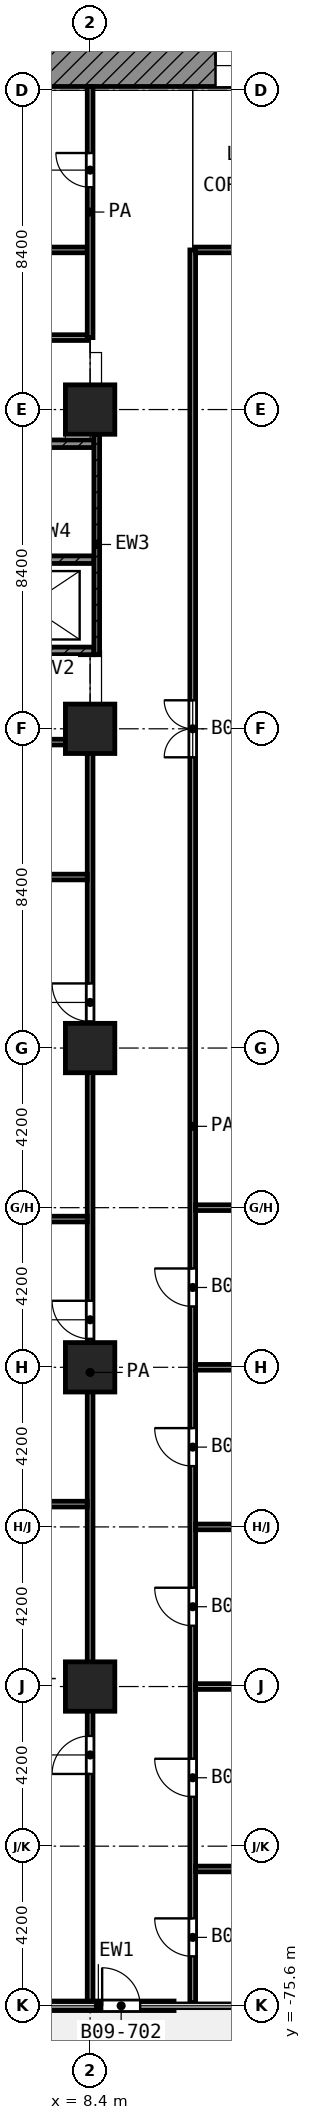
"""IFC4 building model, lengths in metres.
Left out: names, types, materials, properties, quantities, classifications, styles, units other than length and angle.
Written with IfcOpenShell. Run it as: python <this file> out.ifc"""

import sys

from ifc_helpers import new_model, si_unit, direction, frame, frame_2d, origin, origin_2d, place, context, subcontext, project, spatial, rectangle, extrude, element, fill, save


model = new_model("IFC4")
c1 = context("Model", 3, precision=1e-05, world=origin(), true_north=direction((0.0, 1.0)))
c2 = subcontext(c1, "Body", "Model", "MODEL_VIEW")
j1 = project(units=[si_unit("LENGTHUNIT", "METRE"), si_unit("PLANEANGLEUNIT", "RADIAN")], contexts=[c1])
p1 = place(None, origin())
s1 = spatial("IfcSite", under=j1, at=p1, CompositionType="ELEMENT")
p2 = place(p1, origin())
s2 = spatial("IfcBuilding", under=s1, at=p2, CompositionType="ELEMENT")
p3 = place(p2, frame((0.0, 0.0, 43.4)))
s3 = spatial("IfcBuildingStorey", under=s2, at=p3, CompositionType="ELEMENT", Elevation=43.4)
for number, where, z_axis, x_axis in (
    (1, (8.4, -33.6, 0.0), (0.0, 0.0, 1.0), (1.0, 0.0, 0.0)),
    (2, (8.4, -42.0, 0.0), (0.0, 0.0, 1.0), (1.0, 0.0, 0.0)),
    (3, (8.4, -50.4, 0.0), (0.0, 0.0, 1.0), (1.0, 0.0, 0.0)),
    (4, (8.4, -58.8, 0.0), (0.0, 0.0, 1.0), (1.0, 0.0, 0.0)),
    (5, (8.4, -67.2, 0.0), (0.0, 0.0, 1.0), (1.0, 0.0, 0.0)),
):
    element("IfcColumn", number, at=place(p3, frame(where, z_axis=z_axis, x_axis=x_axis)), inside=s3, PredefinedType="COLUMN", context=c2, shape_type="SweptSolid", body=[
        extrude(rectangle(XDim=1.3, YDim=1.3, at=origin_2d()), origin(), (0.0, 0.0, 1.0), 4.2),
    ])
p4 = place(p3, frame((6.625, -75.6, 0.0), z_axis=(0.0, 0.0, 1.0), x_axis=(1.0, 0.0, 0.0)))
e6 = element("IfcWall", 6, at=p4, inside=s3, PredefinedType="SOLIDWALL", context=c2, shape_type="SweptSolid", body=[
    extrude(rectangle(XDim=3.983, YDim=0.25, at=frame_2d((1.992, 0.0))), origin(), (0.0, 0.0, 1.0), 3.78),
])
p5 = place(p4, frame((2.092, 0.0, 0.0)))
e7 = element("IfcOpeningElement", 7, at=p5, cuts=e6, PredefinedType="OPENING", context=c2, shape_type="SweptSolid", body=[
    extrude(rectangle(XDim=1.0, YDim=2.1, at=frame_2d((0.5, 1.05))), frame((0.0, 0.135, 0.0), z_axis=(0.0, -1.0, 0.0), x_axis=(1.0, 0.0, 0.0)), (0.0, 0.0, 1.0), 0.27),
])
p6 = place(p3, frame((5.4, -24.55, 0.0), z_axis=(0.0, 0.0, 1.0), x_axis=(1.0, 0.0, 0.0)))
e8 = element("IfcWall", 8, at=p6, inside=s3, PredefinedType="SHEAR", context=c2, shape_type="SweptSolid", body=[
    extrude(rectangle(XDim=18.6, YDim=1.1, at=frame_2d((9.3, 0.0))), origin(), (0.0, 0.0, 1.0), 3.9),
])
p7 = place(p6, frame((6.3, 0.0, 0.0)))
e9 = element("IfcOpeningElement", 9, at=p7, cuts=e8, PredefinedType="OPENING", context=c2, shape_type="SweptSolid", body=[
    extrude(rectangle(XDim=1.8, YDim=2.1, at=frame_2d((0.9, 1.05))), frame((0.0, 0.56, 0.0), z_axis=(0.0, -1.0, 0.0), x_axis=(1.0, 0.0, 0.0)), (0.0, 0.0, 1.0), 1.12),
])
p8 = place(p3, frame((8.575, -40.05, 0.0), z_axis=(0.0, 0.0, 1.0), x_axis=(0.0, 1.0, 0.0)))
e10 = element("IfcWall", 10, at=p8, inside=s3, PredefinedType="SHEAR", context=c2, shape_type="SweptSolid", body=[
    extrude(rectangle(XDim=5.8, YDim=0.15, at=frame_2d((2.9, 0.0))), origin(), (0.0, 0.0, 1.0), 3.9),
])
p9 = place(p3, frame((0.45, -34.5, 0.0), z_axis=(0.0, 0.0, 1.0), x_axis=(1.0, 0.0, 0.0)))
e11 = element("IfcWall", 11, at=p9, inside=s3, PredefinedType="SHEAR", context=c2, shape_type="SweptSolid", body=[
    extrude(rectangle(XDim=8.05, YDim=0.2, at=frame_2d((4.025, 0.0))), origin(), (0.0, 0.0, 1.0), 3.9),
])
p10 = place(p9, frame((0.75, 0.0, 0.0)))
e12 = element("IfcOpeningElement", 12, at=p10, cuts=e11, PredefinedType="OPENING", context=c2, shape_type="SweptSolid", body=[
    extrude(rectangle(XDim=1.1, YDim=2.1, at=frame_2d((0.55, 1.05))), frame((0.0, 0.11, 0.0), z_axis=(0.0, -1.0, 0.0), x_axis=(1.0, 0.0, 0.0)), (0.0, 0.0, 1.0), 0.22),
])
p11 = place(p3, frame((0.45, -37.55, 0.0), z_axis=(0.0, 0.0, 1.0), x_axis=(1.0, 0.0, 0.0)))
e13 = element("IfcWall", 13, at=p11, inside=s3, PredefinedType="SHEAR", context=c2, shape_type="SweptSolid", body=[
    extrude(rectangle(XDim=8.05, YDim=0.2, at=frame_2d((4.025, 0.0))), origin(), (0.0, 0.0, 1.0), 3.9),
])
p12 = place(p11, frame((0.1, 0.0, 0.0)))
e14 = element("IfcOpeningElement", 14, at=p12, cuts=e13, PredefinedType="OPENING", context=c2, shape_type="SweptSolid", body=[
    extrude(rectangle(XDim=1.1, YDim=2.1, at=frame_2d((0.55, 1.05))), frame((0.0, 0.11, 0.0), z_axis=(0.0, -1.0, 0.0), x_axis=(1.0, 0.0, 0.0)), (0.0, 0.0, 1.0), 0.22),
])
p13 = place(p3, frame((0.45, -39.95, 0.0), z_axis=(0.0, 0.0, 1.0), x_axis=(1.0, 0.0, 0.0)))
e15 = element("IfcWall", 15, at=p13, inside=s3, PredefinedType="SHEAR", context=c2, shape_type="SweptSolid", body=[
    extrude(rectangle(XDim=8.05, YDim=0.2, at=frame_2d((4.025, 0.0))), origin(), (0.0, 0.0, 1.0), 3.9),
])
p14 = place(p13, frame((2.0, 0.0, 0.0)))
e16 = element("IfcOpeningElement", 16, at=p14, cuts=e15, PredefinedType="OPENING", context=c2, shape_type="SweptSolid", body=[
    extrude(rectangle(XDim=1.1, YDim=2.1, at=frame_2d((0.55, 1.05))), frame((0.0, 0.11, 0.0), z_axis=(0.0, -1.0, 0.0), x_axis=(1.0, 0.0, 0.0)), (0.0, 0.0, 1.0), 0.22),
])
p15 = place(p3, frame((11.175, -72.0, 0.0), z_axis=(0.0, 0.0, 1.0), x_axis=(1.0, 0.0, 0.0)))
e17 = element("IfcWall", 17, at=p15, inside=s3, PredefinedType="PARTITIONING", context=c2, shape_type="SweptSolid", body=[
    extrude(rectangle(XDim=11.512, YDim=0.15, at=frame_2d((5.756, 0.0))), origin(), (0.0, 0.0, 1.0), 3.9),
])
for number, where, z_axis, x_axis in (
    (18, (11.175, -67.2, 0.0), (0.0, 0.0, 1.0), (1.0, 0.0, 0.0)),
    (19, (11.175, -63.0, 0.0), (0.0, 0.0, 1.0), (1.0, 0.0, 0.0)),
):
    element("IfcWall", number, at=place(p3, frame(where, z_axis=z_axis, x_axis=x_axis)), inside=s3, PredefinedType="PARTITIONING", context=c2, shape_type="SweptSolid", body=[
        extrude(rectangle(XDim=13.945, YDim=0.15, at=frame_2d((6.973, 0.0))), origin(), (0.0, 0.0, 1.0), 3.9),
    ])
p16 = place(p3, frame((0.08, -62.4, 0.0), z_axis=(0.0, 0.0, 1.0), x_axis=(1.0, 0.0, 0.0)))
e20 = element("IfcWall", 20, at=p16, inside=s3, PredefinedType="PARTITIONING", context=c2, shape_type="SweptSolid", body=[
    extrude(rectangle(XDim=8.245, YDim=0.15, at=frame_2d((4.123, 0.0))), origin(), (0.0, 0.0, 1.0), 3.9),
])
p17 = place(p3, frame((11.175, -58.8, 0.0), z_axis=(0.0, 0.0, 1.0), x_axis=(1.0, 0.0, 0.0)))
e21 = element("IfcWall", 21, at=p17, inside=s3, PredefinedType="PARTITIONING", context=c2, shape_type="SweptSolid", body=[
    extrude(rectangle(XDim=13.945, YDim=0.15, at=frame_2d((6.973, 0.0))), origin(), (0.0, 0.0, 1.0), 3.9),
])
p18 = place(p3, frame((0.08, -54.9, 0.0), z_axis=(0.0, 0.0, 1.0), x_axis=(1.0, 0.0, 0.0)))
e22 = element("IfcWall", 22, at=p18, inside=s3, PredefinedType="PARTITIONING", context=c2, shape_type="SweptSolid", body=[
    extrude(rectangle(XDim=8.245, YDim=0.15, at=frame_2d((4.123, 0.0))), origin(), (0.0, 0.0, 1.0), 3.9),
])
p19 = place(p3, frame((11.175, -54.6, 0.0), z_axis=(0.0, 0.0, 1.0), x_axis=(1.0, 0.0, 0.0)))
e23 = element("IfcWall", 23, at=p19, inside=s3, PredefinedType="PARTITIONING", context=c2, shape_type="SweptSolid", body=[
    extrude(rectangle(XDim=13.945, YDim=0.15, at=frame_2d((6.973, 0.0))), origin(), (0.0, 0.0, 1.0), 3.9),
])
p20 = place(p3, frame((0.08, -45.9, 0.0), z_axis=(0.0, 0.0, 1.0), x_axis=(1.0, 0.0, 0.0)))
e24 = element("IfcWall", 24, at=p20, inside=s3, PredefinedType="PARTITIONING", context=c2, shape_type="SweptSolid", body=[
    extrude(rectangle(XDim=8.245, YDim=0.15, at=frame_2d((4.123, 0.0))), origin(), (0.0, 0.0, 1.0), 3.9),
])
p21 = place(p3, frame((2.326, -42.35, 0.0), z_axis=(0.0, 0.0, 1.0), x_axis=(1.0, 0.0, 0.0)))
e25 = element("IfcWall", 25, at=p21, inside=s3, PredefinedType="PARTITIONING", context=c2, shape_type="SweptSolid", body=[
    extrude(rectangle(XDim=5.999, YDim=0.15, at=frame_2d((3.0, 0.0))), origin(), (0.0, 0.0, 1.0), 3.9),
])
p22 = place(p21, frame((2.499, 0.0, 0.0)))
e26 = element("IfcOpeningElement", 26, at=p22, cuts=e25, PredefinedType="OPENING", context=c2, shape_type="SweptSolid", body=[
    extrude(rectangle(XDim=1.0, YDim=2.1, at=frame_2d((0.5, 1.05))), frame((0.0, 0.085, 0.0), z_axis=(0.0, -1.0, 0.0), x_axis=(1.0, 0.0, 0.0)), (0.0, 0.0, 1.0), 0.17),
])
p23 = place(p3, frame((0.08, -31.707, 0.0), z_axis=(0.0, 0.0, 1.0), x_axis=(1.0, 0.0, 0.0)))
e27 = element("IfcWall", 27, at=p23, inside=s3, PredefinedType="PARTITIONING", context=c2, shape_type="SweptSolid", body=[
    extrude(rectangle(XDim=8.245, YDim=0.15, at=frame_2d((4.123, 0.0))), origin(), (0.0, 0.0, 1.0), 3.9),
])
p24 = place(p23, frame((3.62, 0.0, 0.0)))
e28 = element("IfcOpeningElement", 28, at=p24, cuts=e27, PredefinedType="OPENING", context=c2, shape_type="SweptSolid", body=[
    extrude(rectangle(XDim=1.0, YDim=2.1, at=frame_2d((0.5, 1.05))), frame((0.0, 0.085, 0.0), z_axis=(0.0, -1.0, 0.0), x_axis=(1.0, 0.0, 0.0)), (0.0, 0.0, 1.0), 0.17),
])
p25 = place(p3, frame((0.08, -29.4, 0.0), z_axis=(0.0, 0.0, 1.0), x_axis=(1.0, 0.0, 0.0)))
e29 = element("IfcWall", 29, at=p25, inside=s3, PredefinedType="PARTITIONING", context=c2, shape_type="SweptSolid", body=[
    extrude(rectangle(XDim=8.245, YDim=0.15, at=frame_2d((4.123, 0.0))), origin(), (0.0, 0.0, 1.0), 3.9),
])
p26 = place(p3, frame((11.175, -29.4, 0.0), z_axis=(0.0, 0.0, 1.0), x_axis=(1.0, 0.0, 0.0)))
e30 = element("IfcWall", 30, at=p26, inside=s3, PredefinedType="PARTITIONING", context=c2, shape_type="SweptSolid", body=[
    extrude(rectangle(XDim=13.95, YDim=0.15, at=frame_2d((6.975, 0.0))), origin(), (0.0, 0.0, 1.0), 3.9),
])
p27 = place(p3, frame((8.4, -75.52, 0.0), z_axis=(0.0, 0.0, 1.0), x_axis=(0.0, 1.0, 0.0)))
e31 = element("IfcWall", 31, at=p27, inside=s3, PredefinedType="PARTITIONING", context=c2, shape_type="SweptSolid", body=[
    extrude(rectangle(XDim=33.17, YDim=0.15, at=frame_2d((16.585, 0.0))), origin(), (0.0, 0.0, 1.0), 3.9),
])
p28 = place(p27, frame((25.82, 0.0, 0.0)))
e32 = element("IfcOpeningElement", 32, at=p28, cuts=e31, PredefinedType="OPENING", context=c2, shape_type="SweptSolid", body=[
    extrude(rectangle(XDim=1.0, YDim=2.1, at=frame_2d((0.5, 1.05))), frame((0.0, 0.085, 0.0), z_axis=(0.0, -1.0, 0.0), x_axis=(1.0, 0.0, 0.0)), (0.0, 0.0, 1.0), 0.17),
])
p29 = place(p27, frame((17.47, 0.0, 0.0)))
e33 = element("IfcOpeningElement", 33, at=p29, cuts=e31, PredefinedType="OPENING", context=c2, shape_type="SweptSolid", body=[
    extrude(rectangle(XDim=1.0, YDim=2.1, at=frame_2d((0.5, 1.05))), frame((0.0, 0.085, 0.0), z_axis=(0.0, -1.0, 0.0), x_axis=(1.0, 0.0, 0.0)), (0.0, 0.0, 1.0), 0.17),
])
p30 = place(p27, frame((6.02, 0.0, 0.0)))
e34 = element("IfcOpeningElement", 34, at=p30, cuts=e31, PredefinedType="OPENING", context=c2, shape_type="SweptSolid", body=[
    extrude(rectangle(XDim=1.0, YDim=2.1, at=frame_2d((0.5, 1.05))), frame((0.0, 0.085, 0.0), z_axis=(0.0, -1.0, 0.0), x_axis=(1.0, 0.0, 0.0)), (0.0, 0.0, 1.0), 0.17),
])
p31 = place(p3, frame((8.4, -31.707, 0.0), z_axis=(0.0, 0.0, 1.0), x_axis=(0.0, 1.0, 0.0)))
e35 = element("IfcWall", 35, at=p31, inside=s3, PredefinedType="PARTITIONING", context=c2, shape_type="SweptSolid", body=[
    extrude(rectangle(XDim=6.607, YDim=0.15, at=frame_2d((3.303, 0.0))), origin(), (0.0, 0.0, 1.0), 3.9),
])
p32 = place(p31, frame((3.957, 0.0, 0.0)))
e36 = element("IfcOpeningElement", 36, at=p32, cuts=e35, PredefinedType="OPENING", context=c2, shape_type="SweptSolid", body=[
    extrude(rectangle(XDim=0.9, YDim=2.1, at=frame_2d((0.45, 1.05))), frame((0.0, 0.085, 0.0), z_axis=(0.0, -1.0, 0.0), x_axis=(1.0, 0.0, 0.0)), (0.0, 0.0, 1.0), 0.17),
])
p33 = place(p3, frame((11.1, -75.52, 0.0), z_axis=(0.0, 0.0, 1.0), x_axis=(0.0, 1.0, 0.0)))
e37 = element("IfcWall", 37, at=p33, inside=s3, PredefinedType="PARTITIONING", context=c2, shape_type="SweptSolid", body=[
    extrude(rectangle(XDim=46.12, YDim=0.15, at=frame_2d((23.06, 0.0))), origin(), (0.0, 0.0, 1.0), 3.9),
])
p34 = place(p33, frame((32.77, 0.0, 0.0)))
e38 = element("IfcOpeningElement", 38, at=p34, cuts=e37, PredefinedType="OPENING", context=c2, shape_type="SweptSolid", body=[
    extrude(rectangle(XDim=1.5, YDim=2.1, at=frame_2d((0.75, 1.05))), frame((0.0, 0.085, 0.0), z_axis=(0.0, -1.0, 0.0), x_axis=(1.0, 0.0, 0.0)), (0.0, 0.0, 1.0), 0.17),
])
p35 = place(p33, frame((18.32, 0.0, 0.0)))
e39 = element("IfcOpeningElement", 39, at=p35, cuts=e37, PredefinedType="OPENING", context=c2, shape_type="SweptSolid", body=[
    extrude(rectangle(XDim=1.0, YDim=2.1, at=frame_2d((0.5, 1.05))), frame((0.0, 0.085, 0.0), z_axis=(0.0, -1.0, 0.0), x_axis=(1.0, 0.0, 0.0)), (0.0, 0.0, 1.0), 0.17),
])
p36 = place(p33, frame((14.12, 0.0, 0.0)))
e40 = element("IfcOpeningElement", 40, at=p36, cuts=e37, PredefinedType="OPENING", context=c2, shape_type="SweptSolid", body=[
    extrude(rectangle(XDim=1.0, YDim=2.1, at=frame_2d((0.5, 1.05))), frame((0.0, 0.085, 0.0), z_axis=(0.0, -1.0, 0.0), x_axis=(1.0, 0.0, 0.0)), (0.0, 0.0, 1.0), 0.17),
])
p37 = place(p33, frame((9.92, 0.0, 0.0)))
e41 = element("IfcOpeningElement", 41, at=p37, cuts=e37, PredefinedType="OPENING", context=c2, shape_type="SweptSolid", body=[
    extrude(rectangle(XDim=1.0, YDim=2.1, at=frame_2d((0.5, 1.05))), frame((0.0, 0.085, 0.0), z_axis=(0.0, -1.0, 0.0), x_axis=(1.0, 0.0, 0.0)), (0.0, 0.0, 1.0), 0.17),
])
p38 = place(p33, frame((5.42, 0.0, 0.0)))
e42 = element("IfcOpeningElement", 42, at=p38, cuts=e37, PredefinedType="OPENING", context=c2, shape_type="SweptSolid", body=[
    extrude(rectangle(XDim=1.0, YDim=2.1, at=frame_2d((0.5, 1.05))), frame((0.0, 0.085, 0.0), z_axis=(0.0, -1.0, 0.0), x_axis=(1.0, 0.0, 0.0)), (0.0, 0.0, 1.0), 0.17),
])
p39 = place(p33, frame((1.22, 0.0, 0.0)))
e43 = element("IfcOpeningElement", 43, at=p39, cuts=e37, PredefinedType="OPENING", context=c2, shape_type="SweptSolid", body=[
    extrude(rectangle(XDim=1.0, YDim=2.1, at=frame_2d((0.5, 1.05))), frame((0.0, 0.085, 0.0), z_axis=(0.0, -1.0, 0.0), x_axis=(1.0, 0.0, 0.0)), (0.0, 0.0, 1.0), 0.17),
])
p40 = place(p5, origin())
e44 = element("IfcDoor", 44, at=p40, inside=s3, OperationType="SINGLE_SWING_LEFT", PredefinedType="DOOR", context=c2, shape_type="SweptSolid", body=[
    extrude(rectangle(XDim=1.0, YDim=2.1, at=frame_2d((0.5, 1.05))), frame((0.0, 0.025, 0.0), z_axis=(0.0, -1.0, 0.0), x_axis=(1.0, 0.0, 0.0)), (0.0, 0.0, 1.0), 0.05),
])
fill(e7, e44)
p41 = place(p7, origin())
e45 = element("IfcDoor", 45, at=p41, inside=s3, OperationType="DOUBLE_DOOR_SINGLE_SWING", PredefinedType="DOOR", context=c2, shape_type="SweptSolid", body=[
    extrude(rectangle(XDim=1.8, YDim=2.1, at=frame_2d((0.9, 1.05))), frame((0.0, 0.025, 0.0), z_axis=(0.0, -1.0, 0.0), x_axis=(1.0, 0.0, 0.0)), (0.0, 0.0, 1.0), 0.05),
])
fill(e9, e45)
p42 = place(p32, origin())
e46 = element("IfcDoor", 46, at=p42, inside=s3, OperationType="SINGLE_SWING_RIGHT", PredefinedType="DOOR", context=c2, shape_type="SweptSolid", body=[
    extrude(rectangle(XDim=0.9, YDim=2.1, at=frame_2d((0.45, 1.05))), frame((0.0, 0.025, 0.0), z_axis=(0.0, -1.0, 0.0), x_axis=(1.0, 0.0, 0.0)), (0.0, 0.0, 1.0), 0.05),
])
fill(e36, e46)
p43 = place(p28, origin())
e47 = element("IfcDoor", 47, at=p43, inside=s3, OperationType="SINGLE_SWING_RIGHT", PredefinedType="DOOR", context=c2, shape_type="SweptSolid", body=[
    extrude(rectangle(XDim=1.0, YDim=2.1, at=frame_2d((0.5, 1.05))), frame((0.0, 0.025, 0.0), z_axis=(0.0, -1.0, 0.0), x_axis=(1.0, 0.0, 0.0)), (0.0, 0.0, 1.0), 0.05),
])
fill(e32, e47)
p44 = place(p29, origin())
e48 = element("IfcDoor", 48, at=p44, inside=s3, OperationType="SINGLE_SWING_RIGHT", PredefinedType="DOOR", context=c2, shape_type="SweptSolid", body=[
    extrude(rectangle(XDim=1.0, YDim=2.1, at=frame_2d((0.5, 1.05))), frame((0.0, 0.025, 0.0), z_axis=(0.0, -1.0, 0.0), x_axis=(1.0, 0.0, 0.0)), (0.0, 0.0, 1.0), 0.05),
])
fill(e33, e48)
p45 = place(p30, origin())
e49 = element("IfcDoor", 49, at=p45, inside=s3, OperationType="SINGLE_SWING_LEFT", PredefinedType="DOOR", context=c2, shape_type="SweptSolid", body=[
    extrude(rectangle(XDim=1.0, YDim=2.1, at=frame_2d((0.5, 1.05))), frame((0.0, 0.025, 0.0), z_axis=(0.0, -1.0, 0.0), x_axis=(1.0, 0.0, 0.0)), (0.0, 0.0, 1.0), 0.05),
])
fill(e34, e49)
p46 = place(p34, origin())
e50 = element("IfcDoor", 50, at=p46, inside=s3, OperationType="DOUBLE_DOOR_SINGLE_SWING", PredefinedType="DOOR", context=c2, shape_type="SweptSolid", body=[
    extrude(rectangle(XDim=1.5, YDim=2.1, at=frame_2d((0.75, 1.05))), frame((0.0, 0.025, 0.0), z_axis=(0.0, -1.0, 0.0), x_axis=(1.0, 0.0, 0.0)), (0.0, 0.0, 1.0), 0.05),
])
fill(e38, e50)
p47 = place(p35, origin())
e51 = element("IfcDoor", 51, at=p47, inside=s3, OperationType="SINGLE_SWING_RIGHT", PredefinedType="DOOR", context=c2, shape_type="SweptSolid", body=[
    extrude(rectangle(XDim=1.0, YDim=2.1, at=frame_2d((0.5, 1.05))), frame((0.0, 0.025, 0.0), z_axis=(0.0, -1.0, 0.0), x_axis=(1.0, 0.0, 0.0)), (0.0, 0.0, 1.0), 0.05),
])
fill(e39, e51)
p48 = place(p36, origin())
e52 = element("IfcDoor", 52, at=p48, inside=s3, OperationType="SINGLE_SWING_RIGHT", PredefinedType="DOOR", context=c2, shape_type="SweptSolid", body=[
    extrude(rectangle(XDim=1.0, YDim=2.1, at=frame_2d((0.5, 1.05))), frame((0.0, 0.025, 0.0), z_axis=(0.0, -1.0, 0.0), x_axis=(1.0, 0.0, 0.0)), (0.0, 0.0, 1.0), 0.05),
])
fill(e40, e52)
p49 = place(p37, origin())
e53 = element("IfcDoor", 53, at=p49, inside=s3, OperationType="SINGLE_SWING_RIGHT", PredefinedType="DOOR", context=c2, shape_type="SweptSolid", body=[
    extrude(rectangle(XDim=1.0, YDim=2.1, at=frame_2d((0.5, 1.05))), frame((0.0, 0.025, 0.0), z_axis=(0.0, -1.0, 0.0), x_axis=(1.0, 0.0, 0.0)), (0.0, 0.0, 1.0), 0.05),
])
fill(e41, e53)
p50 = place(p38, origin())
e54 = element("IfcDoor", 54, at=p50, inside=s3, OperationType="SINGLE_SWING_RIGHT", PredefinedType="DOOR", context=c2, shape_type="SweptSolid", body=[
    extrude(rectangle(XDim=1.0, YDim=2.1, at=frame_2d((0.5, 1.05))), frame((0.0, 0.025, 0.0), z_axis=(0.0, -1.0, 0.0), x_axis=(1.0, 0.0, 0.0)), (0.0, 0.0, 1.0), 0.05),
])
fill(e42, e54)
p51 = place(p39, origin())
e55 = element("IfcDoor", 55, at=p51, inside=s3, OperationType="SINGLE_SWING_RIGHT", PredefinedType="DOOR", context=c2, shape_type="SweptSolid", body=[
    extrude(rectangle(XDim=1.0, YDim=2.1, at=frame_2d((0.5, 1.05))), frame((0.0, 0.025, 0.0), z_axis=(0.0, -1.0, 0.0), x_axis=(1.0, 0.0, 0.0)), (0.0, 0.0, 1.0), 0.05),
])
fill(e43, e55)
save(model, sys.argv[1])
